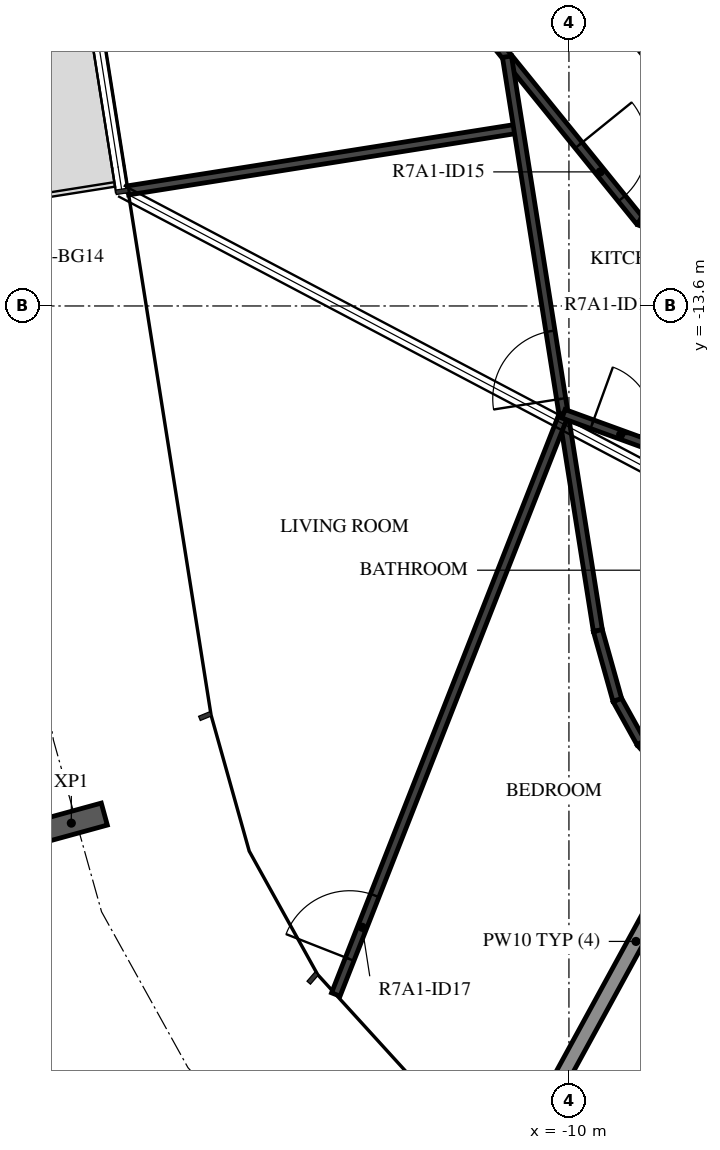
"""IFC4 building model, lengths in metres.
Left out: names, types, materials, properties, quantities, classifications, styles, units other than length and angle.
Written with IfcOpenShell. Run it as: python <this file> out.ifc"""

import sys

from ifc_helpers import new_model, si_unit, direction, frame, frame_2d, origin, origin_2d, place, context, subcontext, project, spatial, rectangle, i_section, extrude, element, fill, save


model = new_model("IFC4")
c1 = context("Model", 3, precision=1e-05, world=origin(), true_north=direction((0.0, 1.0)))
c2 = subcontext(c1, "Body", "Model", "MODEL_VIEW")
j1 = project(units=[si_unit("LENGTHUNIT", "METRE"), si_unit("PLANEANGLEUNIT", "RADIAN")], contexts=[c1])
p1 = place(None, origin())
s1 = spatial("IfcSite", under=j1, at=p1, CompositionType="ELEMENT")
p2 = place(p1, origin())
s2 = spatial("IfcBuilding", under=s1, at=p2, CompositionType="ELEMENT")
p3 = place(p2, frame((0.0, 0.0, 266.9)))
s3 = spatial("IfcBuildingStorey", under=s2, at=p3, CompositionType="ELEMENT", Elevation=266.9)
p4 = place(p3, frame((-16.547, -20.404, -0.38), z_axis=(0.0, 0.0, 1.0), x_axis=(-0.264568938302, 0.964366775084, 0.0)))
e1 = element("IfcColumn", 1, at=p4, inside=s3, PredefinedType="COLUMN", context=c2, shape_type="SweptSolid", body=[
    extrude(i_section(OverallWidth=0.3, OverallDepth=0.9, WebThickness=0.019, FlangeThickness=0.035, FilletRadius=0.03, at=origin_2d()), origin(), (0.0, 0.0, 1.0), 3.5),
])
p5 = place(p3, frame((-12.673, -5.643, 0.0), z_axis=(0.0, 0.0, 1.0), x_axis=(0.629302871585, -0.777160148113, 0.0)))
e2 = element("IfcWall", 2, at=p5, inside=s3, PredefinedType="STANDARD", context=c2, shape_type="SweptSolid", body=[
    extrude(rectangle(XDim=7.181, YDim=0.2, at=frame_2d((3.59, 0.0))), origin(), (0.0, 0.0, 1.0), 3.12),
])
p6 = place(p3, frame((-10.637, -24.738, 0.0), z_axis=(0.0, 0.0, 1.0), x_axis=(0.479683887596, 0.877441375808, 0.0)))
e3 = element("IfcWall", 3, at=p6, inside=s3, PredefinedType="STANDARD", context=c2, shape_type="SweptSolid", body=[
    extrude(rectangle(XDim=6.333, YDim=0.2, at=frame_2d((3.166, 0.0))), origin(), (0.0, 0.0, 1.0), 2.73),
])
p7 = place(p3, frame((-14.092, -6.274, 0.0), z_axis=(0.0, 0.0, 1.0), x_axis=(0.62933367237, -0.777135206268, 0.0)))
e4 = element("IfcWall", 4, at=p7, inside=s3, PredefinedType="PARTITIONING", context=c2, shape_type="SweptSolid", body=[
    extrude(rectangle(XDim=7.985, YDim=0.12, at=frame_2d((3.992, 0.0))), origin(), (0.0, 0.0, 1.0), 3.12),
])
p8 = place(p7, frame((6.707, 0.0, 0.0)))
e5 = element("IfcOpeningElement", 5, at=p8, cuts=e4, PredefinedType="OPENING", context=c2, shape_type="SweptSolid", body=[
    extrude(rectangle(XDim=0.9, YDim=2.1, at=frame_2d((0.45, 1.05))), frame((0.0, 0.07, 0.0), z_axis=(0.0, -1.0, 0.0), x_axis=(1.0, 0.0, 0.0)), (0.0, 0.0, 1.0), 0.14),
])
p9 = place(p3, frame((-9.067, -12.479, 0.0), z_axis=(0.0, 0.0, 1.0), x_axis=(0.933579449035, -0.358370495911, 0.0)))
e6 = element("IfcWall", 6, at=p9, inside=s3, PredefinedType="PARTITIONING", context=c2, shape_type="SweptSolid", body=[
    extrude(rectangle(XDim=7.985, YDim=0.12, at=frame_2d((3.992, 0.0))), origin(), (0.0, 0.0, 1.0), 3.12),
])
p10 = place(p9, frame((4.192, 0.0, 0.0)))
e7 = element("IfcOpeningElement", 7, at=p10, cuts=e6, PredefinedType="OPENING", context=c2, shape_type="SweptSolid", body=[
    extrude(rectangle(XDim=0.9, YDim=2.1, at=frame_2d((0.45, 1.05))), frame((0.0, 0.07, 0.0), z_axis=(0.0, -1.0, 0.0), x_axis=(1.0, 0.0, 0.0)), (0.0, 0.0, 1.0), 0.14),
])
p11 = place(p3, frame((-15.802, -12.08, 0.0), z_axis=(0.0, 0.0, 1.0), x_axis=(0.987687857978, 0.156437512135, 0.0)))
e8 = element("IfcWall", 8, at=p11, inside=s3, PredefinedType="PARTITIONING", context=c2, shape_type="SweptSolid", body=[
    extrude(rectangle(XDim=5.2, YDim=0.12, at=frame_2d((2.6, 0.0))), origin(), (0.0, 0.0, 1.0), 2.73),
])
p12 = place(p3, frame((-9.619, -17.871, 0.0), z_axis=(0.0, 0.0, 1.0), x_axis=(-0.156433255633, 0.987688532146, 0.0)))
e9 = element("IfcWall", 9, at=p12, inside=s3, PredefinedType="PARTITIONING", context=c2, shape_type="SweptSolid", body=[
    extrude(rectangle(XDim=7.644, YDim=0.12, at=frame_2d((3.822, 0.0))), origin(), (0.0, 0.0, 1.0), 3.12),
])
p13 = place(p12, frame((3.087, 0.0, 0.0)))
e10 = element("IfcOpeningElement", 10, at=p13, cuts=e9, PredefinedType="OPENING", context=c2, shape_type="SweptSolid", body=[
    extrude(rectangle(XDim=0.9, YDim=2.1, at=frame_2d((0.45, 1.05))), frame((0.0, 0.07, 0.0), z_axis=(0.0, -1.0, 0.0), x_axis=(1.0, 0.0, 0.0)), (0.0, 0.0, 1.0), 0.14),
])
p14 = place(p3, frame((-13.067, -22.658, 0.0), z_axis=(0.0, 0.0, 1.0), x_axis=(0.365785999331, 0.930698986082, 0.0)))
e11 = element("IfcWall", 11, at=p14, inside=s3, PredefinedType="PARTITIONING", context=c2, shape_type="SweptSolid", body=[
    extrude(rectangle(XDim=8.196, YDim=0.12, at=frame_2d((4.098, 0.0))), origin(), (0.0, 0.0, 1.0), 3.12),
])
p15 = place(p14, frame((0.5, 0.0, 0.0)))
e12 = element("IfcOpeningElement", 12, at=p15, cuts=e11, PredefinedType="OPENING", context=c2, shape_type="SweptSolid", body=[
    extrude(rectangle(XDim=0.9, YDim=2.1, at=frame_2d((0.45, 1.05))), frame((0.0, 0.07, 0.0), z_axis=(0.0, -1.0, 0.0), x_axis=(1.0, 0.0, 0.0)), (0.0, 0.0, 1.0), 0.14),
])
p16 = place(p3, frame((-10.071, -15.019, 0.0), z_axis=(0.0, 0.0, 1.0), x_axis=(0.939648507355, -0.34214131967, 0.0)))
e13 = element("IfcWall", 13, at=p16, inside=s3, PredefinedType="PARTITIONING", context=c2, shape_type="SweptSolid", body=[
    extrude(rectangle(XDim=3.691, YDim=0.12, at=frame_2d((1.846, 0.0))), origin(), (0.0, 0.0, 1.0), 3.12),
])
p17 = place(p16, frame((0.4, 0.0, 0.0)))
e14 = element("IfcOpeningElement", 14, at=p17, cuts=e13, PredefinedType="OPENING", context=c2, shape_type="SweptSolid", body=[
    extrude(rectangle(XDim=0.8, YDim=2.1, at=frame_2d((0.4, 1.05))), frame((0.0, 0.07, 0.0), z_axis=(0.0, -1.0, 0.0), x_axis=(1.0, 0.0, 0.0)), (0.0, 0.0, 1.0), 0.14),
])
for number, where, z_axis, x_axis in (
    (15, (-8.62, -19.818, 0.0), (0.0, 0.0, 1.0), (-0.673, 0.739, 0.0)),
    (16, (-9.052, -19.344, 0.0), (0.0, 0.0, 1.0), (-0.485, 0.874, 0.0)),
):
    element("IfcWall", number, at=place(p3, frame(where, z_axis=z_axis, x_axis=x_axis)), inside=s3, PredefinedType="PARTITIONING", context=c2, shape_type="SweptSolid", body=[
        extrude(rectangle(XDim=0.642, YDim=0.12, at=frame_2d((0.321, 0.0))), origin(), (0.0, 0.0, 1.0), 3.12),
    ])
p18 = place(p3, frame((-9.364, -18.782, 0.0), z_axis=(0.0, 0.0, 1.0), x_axis=(-0.269811707714, 0.962913102196, 0.0)))
e17 = element("IfcWall", 17, at=p18, inside=s3, PredefinedType="PARTITIONING", context=c2, shape_type="SweptSolid", body=[
    extrude(rectangle(XDim=0.947, YDim=0.12, at=frame_2d((0.473, 0.0))), origin(), (0.0, 0.0, 1.0), 3.12),
])
p19 = place(p8, origin())
e18 = element("IfcDoor", 18, at=p19, inside=s3, OperationType="SINGLE_SWING_RIGHT", PredefinedType="DOOR", context=c2, shape_type="SweptSolid", body=[
    extrude(rectangle(XDim=0.9, YDim=2.1, at=frame_2d((0.45, 1.05))), frame((0.0, 0.025, 0.0), z_axis=(0.0, -1.0, 0.0), x_axis=(1.0, 0.0, 0.0)), (0.0, 0.0, 1.0), 0.05),
])
fill(e5, e18)
p20 = place(p13, origin())
e19 = element("IfcDoor", 19, at=p20, inside=s3, OperationType="SINGLE_SWING_RIGHT", PredefinedType="DOOR", context=c2, shape_type="SweptSolid", body=[
    extrude(rectangle(XDim=0.9, YDim=2.1, at=frame_2d((0.45, 1.05))), frame((0.0, 0.025, 0.0), z_axis=(0.0, -1.0, 0.0), x_axis=(1.0, 0.0, 0.0)), (0.0, 0.0, 1.0), 0.05),
])
fill(e10, e19)
p21 = place(p15, origin())
e20 = element("IfcDoor", 20, at=p21, inside=s3, OperationType="SINGLE_SWING_RIGHT", PredefinedType="DOOR", context=c2, shape_type="SweptSolid", body=[
    extrude(rectangle(XDim=0.9, YDim=2.1, at=frame_2d((0.45, 1.05))), frame((0.0, 0.025, 0.0), z_axis=(0.0, -1.0, 0.0), x_axis=(1.0, 0.0, 0.0)), (0.0, 0.0, 1.0), 0.05),
])
fill(e12, e20)
p22 = place(p17, origin())
e21 = element("IfcDoor", 21, at=p22, inside=s3, OperationType="SINGLE_SWING_RIGHT", PredefinedType="DOOR", context=c2, shape_type="SweptSolid", body=[
    extrude(rectangle(XDim=0.8, YDim=2.1, at=frame_2d((0.4, 1.05))), frame((0.0, 0.025, 0.0), z_axis=(0.0, -1.0, 0.0), x_axis=(1.0, 0.0, 0.0)), (0.0, 0.0, 1.0), 0.05),
])
fill(e14, e21)
save(model, sys.argv[1])
